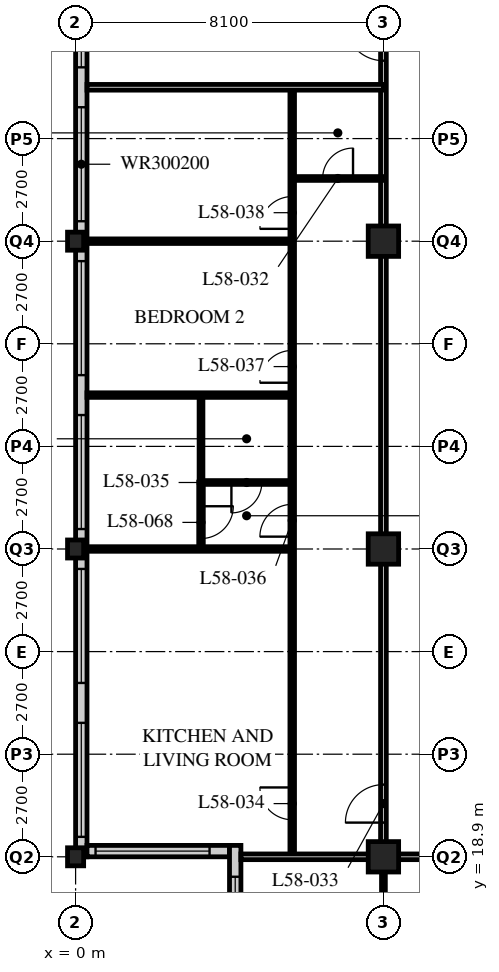
"""IFC4 building model, lengths in metres.
Left out: names, types, materials, properties, quantities, classifications, styles, units other than length and angle.
Written with IfcOpenShell. Run it as: python <this file> out.ifc"""

import sys

from ifc_helpers import new_model, si_unit, direction, frame, frame_2d, origin, origin_2d, place, context, subcontext, project, spatial, rectangle, hollow_rectangle, i_section, extrude, element, fill, save


model = new_model("IFC4")
c1 = context("Model", 3, precision=1e-05, world=origin(), true_north=direction((0.0, 1.0)))
c2 = subcontext(c1, "Body", "Model", "MODEL_VIEW")
j1 = project(units=[si_unit("LENGTHUNIT", "METRE"), si_unit("PLANEANGLEUNIT", "RADIAN")], contexts=[c1])
p1 = place(None, origin())
s1 = spatial("IfcSite", under=j1, at=p1, CompositionType="ELEMENT")
p2 = place(p1, origin())
s2 = spatial("IfcBuilding", under=s1, at=p2, CompositionType="ELEMENT")
p3 = place(p2, frame((0.0, 0.0, 224.4)))
s3 = spatial("IfcBuildingStorey", under=s2, at=p3, CompositionType="ELEMENT", Elevation=224.4)
for number, where, z_axis, x_axis in (
    (1, (0.0, 18.9, 0.0), (0.0, 0.0, 1.0), (1.0, 0.0, 0.0)),
    (2, (0.0, 27.0, 0.0), (0.0, 0.0, 1.0), (1.0, 0.0, 0.0)),
    (3, (0.0, 35.1, 0.0), (0.0, 0.0, 1.0), (1.0, 0.0, 0.0)),
):
    element("IfcColumn", number, at=place(p3, frame(where, z_axis=z_axis, x_axis=x_axis)), inside=s3, PredefinedType="COLUMN", context=c2, shape_type="SweptSolid", body=[
        extrude(i_section(OverallWidth=0.424, OverallDepth=0.475, WebThickness=0.048, FlangeThickness=0.077, FilletRadius=0.015, at=origin_2d()), origin(), (0.0, 0.0, 1.0), 3.6),
    ])
for number, where, z_axis, x_axis in (
    (4, (8.1, 18.9, 0.0), (0.0, 0.0, 1.0), (1.0, 0.0, 0.0)),
    (5, (8.1, 27.0, 0.0), (0.0, 0.0, 1.0), (1.0, 0.0, 0.0)),
    (6, (8.1, 35.1, 0.0), (0.0, 0.0, 1.0), (1.0, 0.0, 0.0)),
):
    element("IfcColumn", number, at=place(p3, frame(where, z_axis=z_axis, x_axis=x_axis)), inside=s3, PredefinedType="COLUMN", context=c2, shape_type="SweptSolid", body=[
        extrude(hollow_rectangle(XDim=0.8, YDim=0.8, WallThickness=0.08, at=origin_2d()), origin(), (0.0, 0.0, 1.0), 3.6),
    ])
p4 = place(p3, frame((0.15, 51.0, 0.0), z_axis=(0.0, 0.0, 1.0), x_axis=(0.0, -1.0, 0.0)))
e7 = element("IfcWall", 7, at=p4, inside=s3, PredefinedType="SOLIDWALL", context=c2, shape_type="SweptSolid", body=[
    extrude(rectangle(XDim=32.1, YDim=0.3, at=frame_2d((16.05, 0.0))), origin(), (0.0, 0.0, 1.0), 3.39),
])
p5 = place(p4, frame((0.225, 0.0, 0.6)))
e8 = element("IfcOpeningElement", 8, at=p5, cuts=e7, PredefinedType="OPENING", context=c2, shape_type="SweptSolid", body=[
    extrude(rectangle(XDim=3.0, YDim=2.0, at=frame_2d((1.5, 1.0))), frame((0.0, 0.16, 0.0), z_axis=(0.0, -1.0, 0.0), x_axis=(1.0, 0.0, 0.0)), (0.0, 0.0, 1.0), 0.32),
])
p6 = place(p4, frame((4.275, 0.0, 0.6)))
e9 = element("IfcOpeningElement", 9, at=p6, cuts=e7, PredefinedType="OPENING", context=c2, shape_type="SweptSolid", body=[
    extrude(rectangle(XDim=3.0, YDim=2.0, at=frame_2d((1.5, 1.0))), frame((0.0, 0.16, 0.0), z_axis=(0.0, -1.0, 0.0), x_axis=(1.0, 0.0, 0.0)), (0.0, 0.0, 1.0), 0.32),
])
p7 = place(p4, frame((8.325, 0.0, 0.6)))
e10 = element("IfcOpeningElement", 10, at=p7, cuts=e7, PredefinedType="OPENING", context=c2, shape_type="SweptSolid", body=[
    extrude(rectangle(XDim=3.0, YDim=2.0, at=frame_2d((1.5, 1.0))), frame((0.0, 0.16, 0.0), z_axis=(0.0, -1.0, 0.0), x_axis=(1.0, 0.0, 0.0)), (0.0, 0.0, 1.0), 0.32),
])
p8 = place(p4, frame((12.375, 0.0, 0.6)))
e11 = element("IfcOpeningElement", 11, at=p8, cuts=e7, PredefinedType="OPENING", context=c2, shape_type="SweptSolid", body=[
    extrude(rectangle(XDim=3.0, YDim=2.0, at=frame_2d((1.5, 1.0))), frame((0.0, 0.16, 0.0), z_axis=(0.0, -1.0, 0.0), x_axis=(1.0, 0.0, 0.0)), (0.0, 0.0, 1.0), 0.32),
])
p9 = place(p4, frame((16.425, 0.0, 0.6)))
e12 = element("IfcOpeningElement", 12, at=p9, cuts=e7, PredefinedType="OPENING", context=c2, shape_type="SweptSolid", body=[
    extrude(rectangle(XDim=3.0, YDim=2.0, at=frame_2d((1.5, 1.0))), frame((0.0, 0.16, 0.0), z_axis=(0.0, -1.0, 0.0), x_axis=(1.0, 0.0, 0.0)), (0.0, 0.0, 1.0), 0.32),
])
p10 = place(p4, frame((20.475, 0.0, 0.6)))
e13 = element("IfcOpeningElement", 13, at=p10, cuts=e7, PredefinedType="OPENING", context=c2, shape_type="SweptSolid", body=[
    extrude(rectangle(XDim=3.0, YDim=2.0, at=frame_2d((1.5, 1.0))), frame((0.0, 0.16, 0.0), z_axis=(0.0, -1.0, 0.0), x_axis=(1.0, 0.0, 0.0)), (0.0, 0.0, 1.0), 0.32),
])
p11 = place(p4, frame((24.525, 0.0, 0.6)))
e14 = element("IfcOpeningElement", 14, at=p11, cuts=e7, PredefinedType="OPENING", context=c2, shape_type="SweptSolid", body=[
    extrude(rectangle(XDim=3.0, YDim=2.0, at=frame_2d((1.5, 1.0))), frame((0.0, 0.16, 0.0), z_axis=(0.0, -1.0, 0.0), x_axis=(1.0, 0.0, 0.0)), (0.0, 0.0, 1.0), 0.32),
])
p12 = place(p4, frame((28.575, 0.0, 0.6)))
e15 = element("IfcOpeningElement", 15, at=p12, cuts=e7, PredefinedType="OPENING", context=c2, shape_type="SweptSolid", body=[
    extrude(rectangle(XDim=3.0, YDim=2.0, at=frame_2d((1.5, 1.0))), frame((0.0, 0.16, 0.0), z_axis=(0.0, -1.0, 0.0), x_axis=(1.0, 0.0, 0.0)), (0.0, 0.0, 1.0), 0.32),
])
p13 = place(p3, frame((0.3, 19.05, 0.0), z_axis=(0.0, 0.0, 1.0), x_axis=(1.0, 0.0, 0.0)))
e16 = element("IfcWall", 16, at=p13, inside=s3, PredefinedType="SOLIDWALL", context=c2, shape_type="SweptSolid", body=[
    extrude(rectangle(XDim=3.75, YDim=0.3, at=frame_2d((1.875, 0.0))), origin(), (0.0, 0.0, 1.0), 3.39),
])
p14 = place(p13, frame((0.225, 0.0, 0.6)))
e17 = element("IfcOpeningElement", 17, at=p14, cuts=e16, PredefinedType="OPENING", context=c2, shape_type="SweptSolid", body=[
    extrude(rectangle(XDim=3.0, YDim=2.0, at=frame_2d((1.5, 1.0))), frame((0.0, 0.16, 0.0), z_axis=(0.0, -1.0, 0.0), x_axis=(1.0, 0.0, 0.0)), (0.0, 0.0, 1.0), 0.32),
])
p15 = place(p3, frame((4.2, 19.2, 0.0), z_axis=(0.0, 0.0, 1.0), x_axis=(0.0, -1.0, 0.0)))
e18 = element("IfcWall", 18, at=p15, inside=s3, PredefinedType="SOLIDWALL", context=c2, shape_type="SweptSolid", body=[
    extrude(rectangle(XDim=4.35, YDim=0.3, at=frame_2d((2.175, 0.0))), origin(), (0.0, 0.0, 1.0), 3.39),
])
p16 = place(p15, frame((0.825, 0.0, 0.6)))
e19 = element("IfcOpeningElement", 19, at=p16, cuts=e18, PredefinedType="OPENING", context=c2, shape_type="SweptSolid", body=[
    extrude(rectangle(XDim=3.0, YDim=2.0, at=frame_2d((1.5, 1.0))), frame((0.0, 0.16, 0.0), z_axis=(0.0, -1.0, 0.0), x_axis=(1.0, 0.0, 0.0)), (0.0, 0.0, 1.0), 0.32),
])
p17 = place(p3, frame((8.1, 18.9, 0.0), z_axis=(0.0, 0.0, 1.0), x_axis=(1.0, 0.0, 0.0)))
e20 = element("IfcWall", 20, at=p17, inside=s3, PredefinedType="PARTITIONING", context=c2, shape_type="SweptSolid", body=[
    extrude(rectangle(XDim=36.45, YDim=0.15, at=frame_2d((18.225, 0.0))), origin(), (0.0, 0.0, 1.0), 2.628),
])
p18 = place(p17, frame((4.45, 0.0, 0.0)))
e21 = element("IfcOpeningElement", 21, at=p18, cuts=e20, PredefinedType="OPENING", context=c2, shape_type="SweptSolid", body=[
    extrude(rectangle(XDim=1.0, YDim=2.1, at=frame_2d((0.5, 1.05))), frame((0.0, 0.085, 0.0), z_axis=(0.0, -1.0, 0.0), x_axis=(1.0, 0.0, 0.0)), (0.0, 0.0, 1.0), 0.17),
])
p19 = place(p17, frame((17.1, 0.0, 0.0)))
e22 = element("IfcOpeningElement", 22, at=p19, cuts=e20, PredefinedType="OPENING", context=c2, shape_type="SweptSolid", body=[
    extrude(rectangle(XDim=1.0, YDim=2.1, at=frame_2d((0.5, 1.05))), frame((0.0, 0.085, 0.0), z_axis=(0.0, -1.0, 0.0), x_axis=(1.0, 0.0, 0.0)), (0.0, 0.0, 1.0), 0.17),
])
p20 = place(p17, frame((29.05, 0.0, 0.0)))
e23 = element("IfcOpeningElement", 23, at=p20, cuts=e20, PredefinedType="OPENING", context=c2, shape_type="SweptSolid", body=[
    extrude(rectangle(XDim=1.0, YDim=2.1, at=frame_2d((0.5, 1.05))), frame((0.0, 0.085, 0.0), z_axis=(0.0, -1.0, 0.0), x_axis=(1.0, 0.0, 0.0)), (0.0, 0.0, 1.0), 0.17),
])
p21 = place(p17, frame((2.625, 0.0, 0.0)))
e24 = element("IfcOpeningElement", 24, at=p21, cuts=e20, PredefinedType="OPENING", context=c2, shape_type="SweptSolid", body=[
    extrude(rectangle(XDim=1.0, YDim=2.1, at=frame_2d((0.5, 1.05))), frame((0.0, 0.085, 0.0), z_axis=(0.0, -1.0, 0.0), x_axis=(1.0, 0.0, 0.0)), (0.0, 0.0, 1.0), 0.17),
])
p22 = place(p17, frame((33.925, 0.0, 0.0)))
e25 = element("IfcOpeningElement", 25, at=p22, cuts=e20, PredefinedType="OPENING", context=c2, shape_type="SweptSolid", body=[
    extrude(rectangle(XDim=1.0, YDim=2.1, at=frame_2d((0.5, 1.05))), frame((0.0, 0.085, 0.0), z_axis=(0.0, -1.0, 0.0), x_axis=(1.0, 0.0, 0.0)), (0.0, 0.0, 1.0), 0.17),
])
p23 = place(p3, frame((8.1, 18.9, 0.0), z_axis=(0.0, 0.0, 1.0), x_axis=(0.0, 1.0, 0.0)))
e26 = element("IfcWall", 26, at=p23, inside=s3, PredefinedType="PARTITIONING", context=c2, shape_type="SweptSolid", body=[
    extrude(rectangle(XDim=24.3, YDim=0.15, at=frame_2d((12.15, 0.0))), origin(), (0.0, 0.0, 1.0), 2.628),
])
p24 = place(p23, frame((0.9, 0.0, 0.0)))
e27 = element("IfcOpeningElement", 27, at=p24, cuts=e26, PredefinedType="OPENING", context=c2, shape_type="SweptSolid", body=[
    extrude(rectangle(XDim=1.0, YDim=2.1, at=frame_2d((0.5, 1.05))), frame((0.0, 0.085, 0.0), z_axis=(0.0, -1.0, 0.0), x_axis=(1.0, 0.0, 0.0)), (0.0, 0.0, 1.0), 0.17),
])
p25 = place(p23, frame((20.95, 0.0, 0.0)))
e28 = element("IfcOpeningElement", 28, at=p25, cuts=e26, PredefinedType="OPENING", context=c2, shape_type="SweptSolid", body=[
    extrude(rectangle(XDim=1.0, YDim=2.1, at=frame_2d((0.5, 1.05))), frame((0.0, 0.085, 0.0), z_axis=(0.0, -1.0, 0.0), x_axis=(1.0, 0.0, 0.0)), (0.0, 0.0, 1.0), 0.17),
])
p26 = place(p3, frame((5.7, 18.9, 0.0), z_axis=(0.0, 0.0, 1.0), x_axis=(0.0, 1.0, 0.0)))
e29 = element("IfcWall", 29, at=p26, inside=s3, PredefinedType="PARTITIONING", context=c2, shape_type="SweptSolid", body=[
    extrude(rectangle(XDim=20.25, YDim=0.12, at=frame_2d((10.125, 0.0))), origin(), (0.0, 0.0, 1.0), 3.39),
])
p27 = place(p26, frame((0.975, 0.0, 0.0)))
e30 = element("IfcOpeningElement", 30, at=p27, cuts=e29, PredefinedType="OPENING", context=c2, shape_type="SweptSolid", body=[
    extrude(rectangle(XDim=0.85, YDim=2.1, at=frame_2d((0.425, 1.05))), frame((0.0, 0.07, 0.0), z_axis=(0.0, -1.0, 0.0), x_axis=(1.0, 0.0, 0.0)), (0.0, 0.0, 1.0), 0.14),
])
p28 = place(p26, frame((8.425, 0.0, 0.0)))
e31 = element("IfcOpeningElement", 31, at=p28, cuts=e29, PredefinedType="OPENING", context=c2, shape_type="SweptSolid", body=[
    extrude(rectangle(XDim=0.85, YDim=2.1, at=frame_2d((0.425, 1.05))), frame((0.0, 0.07, 0.0), z_axis=(0.0, -1.0, 0.0), x_axis=(1.0, 0.0, 0.0)), (0.0, 0.0, 1.0), 0.14),
])
p29 = place(p26, frame((12.475, 0.0, 0.0)))
e32 = element("IfcOpeningElement", 32, at=p29, cuts=e29, PredefinedType="OPENING", context=c2, shape_type="SweptSolid", body=[
    extrude(rectangle(XDim=0.85, YDim=2.1, at=frame_2d((0.425, 1.05))), frame((0.0, 0.07, 0.0), z_axis=(0.0, -1.0, 0.0), x_axis=(1.0, 0.0, 0.0)), (0.0, 0.0, 1.0), 0.14),
])
p30 = place(p26, frame((16.525, 0.0, 0.0)))
e33 = element("IfcOpeningElement", 33, at=p30, cuts=e29, PredefinedType="OPENING", context=c2, shape_type="SweptSolid", body=[
    extrude(rectangle(XDim=0.85, YDim=2.1, at=frame_2d((0.425, 1.05))), frame((0.0, 0.07, 0.0), z_axis=(0.0, -1.0, 0.0), x_axis=(1.0, 0.0, 0.0)), (0.0, 0.0, 1.0), 0.14),
])
p31 = place(p3, frame((8.1, 36.75, 0.0), z_axis=(0.0, 0.0, 1.0), x_axis=(-1.0, 0.0, 0.0)))
e34 = element("IfcWall", 34, at=p31, inside=s3, PredefinedType="PARTITIONING", context=c2, shape_type="SweptSolid", body=[
    extrude(rectangle(XDim=2.4, YDim=0.1, at=frame_2d((1.2, 0.0))), origin(), (0.0, 0.0, 1.0), 3.39),
])
p32 = place(p31, frame((0.8, 0.0, 0.0)))
e35 = element("IfcOpeningElement", 35, at=p32, cuts=e34, PredefinedType="OPENING", context=c2, shape_type="SweptSolid", body=[
    extrude(rectangle(XDim=0.8, YDim=2.1, at=frame_2d((0.4, 1.05))), frame((0.0, 0.06, 0.0), z_axis=(0.0, -1.0, 0.0), x_axis=(1.0, 0.0, 0.0)), (0.0, 0.0, 1.0), 0.12),
])
p33 = place(p3, frame((5.7, 28.75, 0.0), z_axis=(0.0, 0.0, 1.0), x_axis=(-1.0, 0.0, 0.0)))
e36 = element("IfcWall", 36, at=p33, inside=s3, PredefinedType="PARTITIONING", context=c2, shape_type="SweptSolid", body=[
    extrude(rectangle(XDim=2.4, YDim=0.1, at=frame_2d((1.2, 0.0))), origin(), (0.0, 0.0, 1.0), 3.39),
])
p34 = place(p33, frame((0.8, 0.0, 0.0)))
e37 = element("IfcOpeningElement", 37, at=p34, cuts=e36, PredefinedType="OPENING", context=c2, shape_type="SweptSolid", body=[
    extrude(rectangle(XDim=0.8, YDim=2.1, at=frame_2d((0.4, 1.05))), frame((0.0, 0.06, 0.0), z_axis=(0.0, -1.0, 0.0), x_axis=(1.0, 0.0, 0.0)), (0.0, 0.0, 1.0), 0.12),
])
p35 = place(p3, frame((3.3, 28.75, 0.0), z_axis=(0.0, 0.0, 1.0), x_axis=(0.0, 1.0, 0.0)))
e38 = element("IfcWall", 38, at=p35, inside=s3, PredefinedType="PARTITIONING", context=c2, shape_type="SweptSolid", body=[
    extrude(rectangle(XDim=2.3, YDim=0.1, at=frame_2d((1.15, 0.0))), origin(), (0.0, 0.0, 1.0), 3.39),
])
p36 = place(p3, frame((5.7, 27.0, 0.0), z_axis=(0.0, 0.0, 1.0), x_axis=(-1.0, 0.0, 0.0)))
e39 = element("IfcWall", 39, at=p36, inside=s3, PredefinedType="PARTITIONING", context=c2, shape_type="SweptSolid", body=[
    extrude(rectangle(XDim=5.4, YDim=0.12, at=frame_2d((2.7, 0.0))), origin(), (0.0, 0.0, 1.0), 2.628),
])
p37 = place(p3, frame((5.7, 31.05, 0.0), z_axis=(0.0, 0.0, 1.0), x_axis=(-1.0, 0.0, 0.0)))
e40 = element("IfcWall", 40, at=p37, inside=s3, PredefinedType="PARTITIONING", context=c2, shape_type="SweptSolid", body=[
    extrude(rectangle(XDim=5.4, YDim=0.12, at=frame_2d((2.7, 0.0))), origin(), (0.0, 0.0, 1.0), 3.39),
])
p38 = place(p3, frame((5.7, 35.1, 0.0), z_axis=(0.0, 0.0, 1.0), x_axis=(-1.0, 0.0, 0.0)))
e41 = element("IfcWall", 41, at=p38, inside=s3, PredefinedType="PARTITIONING", context=c2, shape_type="SweptSolid", body=[
    extrude(rectangle(XDim=5.4, YDim=0.12, at=frame_2d((2.7, 0.0))), origin(), (0.0, 0.0, 1.0), 2.628),
])
p39 = place(p3, frame((8.1, 39.15, 0.0), z_axis=(0.0, 0.0, 1.0), x_axis=(-1.0, 0.0, 0.0)))
e42 = element("IfcWall", 42, at=p39, inside=s3, PredefinedType="PARTITIONING", context=c2, shape_type="SweptSolid", body=[
    extrude(rectangle(XDim=7.8, YDim=0.15, at=frame_2d((3.9, 0.0))), origin(), (0.0, 0.0, 1.0), 3.39),
])
p40 = place(p3, frame((8.1, 18.9, 0.0), z_axis=(0.0, 0.0, 1.0), x_axis=(0.0, -1.0, 0.0)))
e43 = element("IfcWall", 43, at=p40, inside=s3, PredefinedType="PARTITIONING", context=c2, shape_type="SweptSolid", body=[
    extrude(rectangle(XDim=2.4, YDim=0.1, at=frame_2d((1.2, 0.0))), origin(), (0.0, 0.0, 1.0), 2.628),
])
p41 = place(p3, frame((4.35, 18.9, 0.0), z_axis=(0.0, 0.0, 1.0), x_axis=(1.0, 0.0, 0.0)))
e44 = element("IfcWall", 44, at=p41, inside=s3, PredefinedType="PARTITIONING", context=c2, shape_type="SweptSolid", body=[
    extrude(rectangle(XDim=3.75, YDim=0.15, at=frame_2d((1.875, 0.0))), origin(), (0.0, 0.0, 1.0), 2.628),
])
p42 = place(p3, frame((3.3, 27.0, 0.0), z_axis=(0.0, 0.0, 1.0), x_axis=(0.0, 1.0, 0.0)))
e45 = element("IfcWall", 45, at=p42, inside=s3, PredefinedType="PARTITIONING", context=c2, shape_type="SweptSolid", body=[
    extrude(rectangle(XDim=1.76, YDim=0.12, at=frame_2d((0.88, 0.0))), origin(), (0.0, 0.0, 1.0), 3.39),
])
p43 = place(p42, frame((0.275, 0.0, 0.0)))
e46 = element("IfcOpeningElement", 46, at=p43, cuts=e45, PredefinedType="OPENING", context=c2, shape_type="SweptSolid", body=[
    extrude(rectangle(XDim=0.85, YDim=2.1, at=frame_2d((0.425, 1.05))), frame((0.0, 0.07, 0.0), z_axis=(0.0, -1.0, 0.0), x_axis=(1.0, 0.0, 0.0)), (0.0, 0.0, 1.0), 0.14),
])
p44 = place(p7, origin())
e47 = element("IfcWindow", 47, at=p44, inside=s3, PartitioningType="SINGLE_PANEL", PredefinedType="WINDOW", context=c2, shape_type="SweptSolid", body=[
    extrude(rectangle(XDim=3.0, YDim=2.0, at=frame_2d((1.5, 1.0))), frame((0.0, 0.03, 0.0), z_axis=(0.0, -1.0, 0.0), x_axis=(1.0, 0.0, 0.0)), (0.0, 0.0, 1.0), 0.06),
])
fill(e10, e47)
p45 = place(p8, origin())
e48 = element("IfcWindow", 48, at=p45, inside=s3, PartitioningType="SINGLE_PANEL", PredefinedType="WINDOW", context=c2, shape_type="SweptSolid", body=[
    extrude(rectangle(XDim=3.0, YDim=2.0, at=frame_2d((1.5, 1.0))), frame((0.0, 0.03, 0.0), z_axis=(0.0, -1.0, 0.0), x_axis=(1.0, 0.0, 0.0)), (0.0, 0.0, 1.0), 0.06),
])
fill(e11, e48)
p46 = place(p9, origin())
e49 = element("IfcWindow", 49, at=p46, inside=s3, PartitioningType="SINGLE_PANEL", PredefinedType="WINDOW", context=c2, shape_type="SweptSolid", body=[
    extrude(rectangle(XDim=3.0, YDim=2.0, at=frame_2d((1.5, 1.0))), frame((0.0, 0.03, 0.0), z_axis=(0.0, -1.0, 0.0), x_axis=(1.0, 0.0, 0.0)), (0.0, 0.0, 1.0), 0.06),
])
fill(e12, e49)
p47 = place(p10, origin())
e50 = element("IfcWindow", 50, at=p47, inside=s3, PartitioningType="SINGLE_PANEL", PredefinedType="WINDOW", context=c2, shape_type="SweptSolid", body=[
    extrude(rectangle(XDim=3.0, YDim=2.0, at=frame_2d((1.5, 1.0))), frame((0.0, 0.03, 0.0), z_axis=(0.0, -1.0, 0.0), x_axis=(1.0, 0.0, 0.0)), (0.0, 0.0, 1.0), 0.06),
])
fill(e13, e50)
p48 = place(p11, origin())
e51 = element("IfcWindow", 51, at=p48, inside=s3, PartitioningType="SINGLE_PANEL", PredefinedType="WINDOW", context=c2, shape_type="SweptSolid", body=[
    extrude(rectangle(XDim=3.0, YDim=2.0, at=frame_2d((1.5, 1.0))), frame((0.0, 0.03, 0.0), z_axis=(0.0, -1.0, 0.0), x_axis=(1.0, 0.0, 0.0)), (0.0, 0.0, 1.0), 0.06),
])
fill(e14, e51)
p49 = place(p12, origin())
e52 = element("IfcWindow", 52, at=p49, inside=s3, PartitioningType="SINGLE_PANEL", PredefinedType="WINDOW", context=c2, shape_type="SweptSolid", body=[
    extrude(rectangle(XDim=3.0, YDim=2.0, at=frame_2d((1.5, 1.0))), frame((0.0, 0.03, 0.0), z_axis=(0.0, -1.0, 0.0), x_axis=(1.0, 0.0, 0.0)), (0.0, 0.0, 1.0), 0.06),
])
fill(e15, e52)
p50 = place(p14, origin())
e53 = element("IfcWindow", 53, at=p50, inside=s3, PartitioningType="SINGLE_PANEL", PredefinedType="WINDOW", context=c2, shape_type="SweptSolid", body=[
    extrude(rectangle(XDim=3.0, YDim=2.0, at=frame_2d((1.5, 1.0))), frame((0.0, 0.03, 0.0), z_axis=(0.0, -1.0, 0.0), x_axis=(1.0, 0.0, 0.0)), (0.0, 0.0, 1.0), 0.06),
])
fill(e17, e53)
p51 = place(p16, origin())
e54 = element("IfcWindow", 54, at=p51, inside=s3, PartitioningType="SINGLE_PANEL", PredefinedType="WINDOW", context=c2, shape_type="SweptSolid", body=[
    extrude(rectangle(XDim=3.0, YDim=2.0, at=frame_2d((1.5, 1.0))), frame((0.0, 0.03, 0.0), z_axis=(0.0, -1.0, 0.0), x_axis=(1.0, 0.0, 0.0)), (0.0, 0.0, 1.0), 0.06),
])
fill(e19, e54)
p52 = place(p32, origin())
e55 = element("IfcDoor", 55, at=p52, inside=s3, OperationType="SINGLE_SWING_RIGHT", PredefinedType="DOOR", context=c2, shape_type="SweptSolid", body=[
    extrude(rectangle(XDim=0.8, YDim=2.1, at=frame_2d((0.4, 1.05))), frame((0.0, 0.025, 0.0), z_axis=(0.0, -1.0, 0.0), x_axis=(1.0, 0.0, 0.0)), (0.0, 0.0, 1.0), 0.05),
])
fill(e35, e55)
p53 = place(p24, origin())
e56 = element("IfcDoor", 56, at=p53, inside=s3, OperationType="SINGLE_SWING_LEFT", PredefinedType="DOOR", context=c2, shape_type="SweptSolid", body=[
    extrude(rectangle(XDim=1.0, YDim=2.1, at=frame_2d((0.5, 1.05))), frame((0.0, 0.025, 0.0), z_axis=(0.0, -1.0, 0.0), x_axis=(1.0, 0.0, 0.0)), (0.0, 0.0, 1.0), 0.05),
])
fill(e27, e56)
p54 = place(p27, origin())
e57 = element("IfcDoor", 57, at=p54, inside=s3, OperationType="SINGLE_SWING_RIGHT", PredefinedType="DOOR", context=c2, shape_type="SweptSolid", body=[
    extrude(rectangle(XDim=0.85, YDim=2.1, at=frame_2d((0.425, 1.05))), frame((0.0, 0.025, 0.0), z_axis=(0.0, -1.0, 0.0), x_axis=(1.0, 0.0, 0.0)), (0.0, 0.0, 1.0), 0.05),
])
fill(e30, e57)
p55 = place(p34, origin())
e58 = element("IfcDoor", 58, at=p55, inside=s3, OperationType="SINGLE_SWING_RIGHT", PredefinedType="DOOR", context=c2, shape_type="SweptSolid", body=[
    extrude(rectangle(XDim=0.8, YDim=2.1, at=frame_2d((0.4, 1.05))), frame((0.0, 0.025, 0.0), z_axis=(0.0, -1.0, 0.0), x_axis=(1.0, 0.0, 0.0)), (0.0, 0.0, 1.0), 0.05),
])
fill(e37, e58)
p56 = place(p28, origin())
e59 = element("IfcDoor", 59, at=p56, inside=s3, OperationType="SINGLE_SWING_LEFT", PredefinedType="DOOR", context=c2, shape_type="SweptSolid", body=[
    extrude(rectangle(XDim=0.85, YDim=2.1, at=frame_2d((0.425, 1.05))), frame((0.0, 0.025, 0.0), z_axis=(0.0, -1.0, 0.0), x_axis=(1.0, 0.0, 0.0)), (0.0, 0.0, 1.0), 0.05),
])
fill(e31, e59)
p57 = place(p29, origin())
e60 = element("IfcDoor", 60, at=p57, inside=s3, OperationType="SINGLE_SWING_LEFT", PredefinedType="DOOR", context=c2, shape_type="SweptSolid", body=[
    extrude(rectangle(XDim=0.85, YDim=2.1, at=frame_2d((0.425, 1.05))), frame((0.0, 0.025, 0.0), z_axis=(0.0, -1.0, 0.0), x_axis=(1.0, 0.0, 0.0)), (0.0, 0.0, 1.0), 0.05),
])
fill(e32, e60)
p58 = place(p30, origin())
e61 = element("IfcDoor", 61, at=p58, inside=s3, OperationType="SINGLE_SWING_LEFT", PredefinedType="DOOR", context=c2, shape_type="SweptSolid", body=[
    extrude(rectangle(XDim=0.85, YDim=2.1, at=frame_2d((0.425, 1.05))), frame((0.0, 0.025, 0.0), z_axis=(0.0, -1.0, 0.0), x_axis=(1.0, 0.0, 0.0)), (0.0, 0.0, 1.0), 0.05),
])
fill(e33, e61)
p59 = place(p25, origin())
e62 = element("IfcDoor", 62, at=p59, inside=s3, OperationType="SINGLE_SWING_RIGHT", PredefinedType="DOOR", context=c2, shape_type="SweptSolid", body=[
    extrude(rectangle(XDim=1.0, YDim=2.1, at=frame_2d((0.5, 1.05))), frame((0.0, 0.025, 0.0), z_axis=(0.0, -1.0, 0.0), x_axis=(1.0, 0.0, 0.0)), (0.0, 0.0, 1.0), 0.05),
])
fill(e28, e62)
p60 = place(p43, origin())
e63 = element("IfcDoor", 63, at=p60, inside=s3, OperationType="SINGLE_SWING_LEFT", PredefinedType="DOOR", context=c2, shape_type="SweptSolid", body=[
    extrude(rectangle(XDim=0.85, YDim=2.1, at=frame_2d((0.425, 1.05))), frame((0.0, 0.025, 0.0), z_axis=(0.0, -1.0, 0.0), x_axis=(1.0, 0.0, 0.0)), (0.0, 0.0, 1.0), 0.05),
])
fill(e46, e63)
save(model, sys.argv[1])
